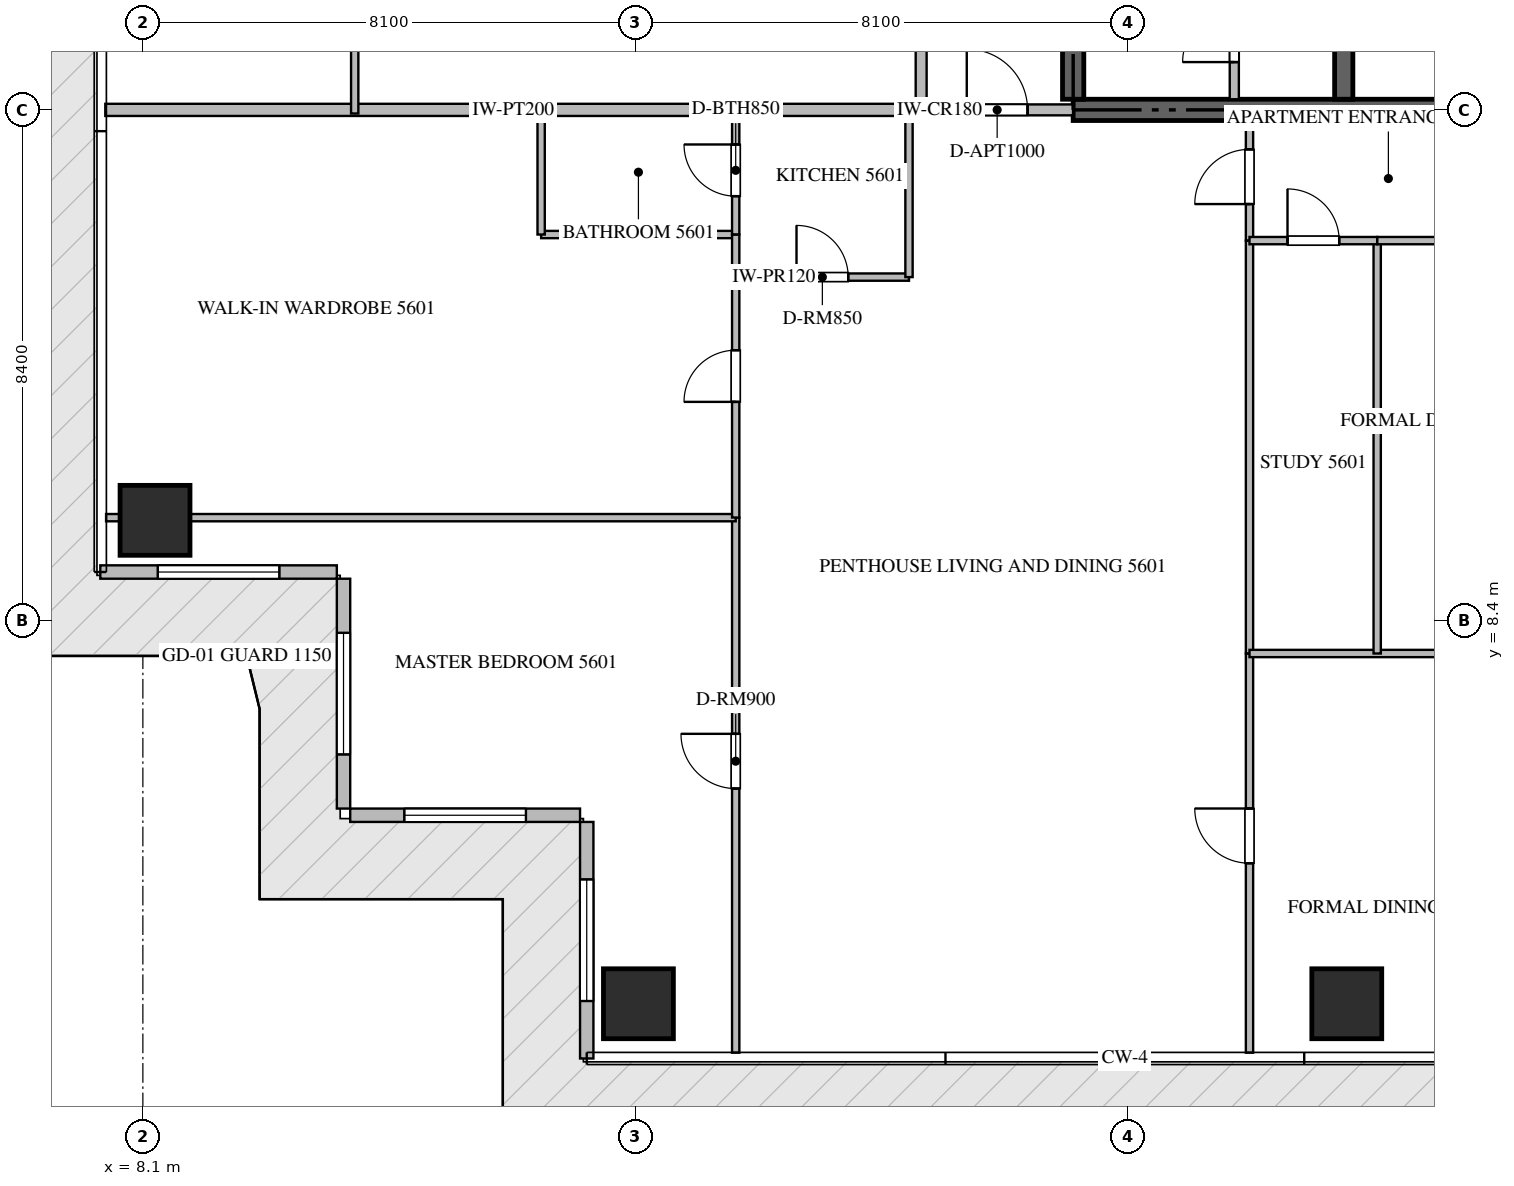
"""IFC4 building model, lengths in metres.
Left out: names, types, materials, properties, quantities, classifications, styles, units other than length and angle.
Written with IfcOpenShell. Run it as: python <this file> out.ifc"""

import sys

from ifc_helpers import new_model, si_unit, direction, frame, frame_2d, origin, origin_2d, place, context, subcontext, project, spatial, rectangle, extrude, source, transform, mapped, element, fill, save


model = new_model("IFC4")
c1 = context("Model", 3, precision=1e-05, world=origin(), true_north=direction((0.0, 1.0)))
c2 = subcontext(c1, "Body", "Model", "MODEL_VIEW")
j1 = project(units=[si_unit("LENGTHUNIT", "METRE"), si_unit("PLANEANGLEUNIT", "RADIAN")], contexts=[c1])
p1 = place(None, origin())
s1 = spatial("IfcSite", under=j1, at=p1, CompositionType="ELEMENT")
p2 = place(p1, origin())
s2 = spatial("IfcBuilding", under=s1, at=p2, CompositionType="ELEMENT")
p3 = place(p2, frame((0.0, 0.0, 225.85)))
s3 = spatial("IfcBuildingStorey", under=s2, at=p3, CompositionType="ELEMENT", Elevation=225.85)
p4 = place(p3, frame((23.4, 16.8, -0.26), z_axis=(0.0, 0.0, 1.0), x_axis=(1.0, 0.0, 0.0)))
e1 = element("IfcWall", 1, at=p4, inside=s3, PredefinedType="SHEAR", context=c2, shape_type="SweptSolid", body=[
    extrude(rectangle(XDim=18.0, YDim=0.35, at=frame_2d((9.0, 0.0))), origin(), (0.0, 0.0, 1.0), 3.848),
])
p5 = place(p3, frame((23.4, 16.975, -0.26), z_axis=(0.0, 0.0, 1.0), x_axis=(0.0, 1.0, 0.0)))
e2 = element("IfcWall", 2, at=p5, inside=s3, PredefinedType="SHEAR", context=c2, shape_type="SweptSolid", body=[
    extrude(rectangle(XDim=4.875, YDim=0.35, at=frame_2d((2.438, 0.0))), origin(), (0.0, 0.0, 1.0), 3.848),
])
p6 = place(p3, frame((27.85, 16.975, -0.26), z_axis=(0.0, 0.0, 1.0), x_axis=(0.0, 1.0, 0.0)))
e3 = element("IfcWall", 3, at=p6, inside=s3, PredefinedType="SHEAR", context=c2, shape_type="SweptSolid", body=[
    extrude(rectangle(XDim=4.875, YDim=0.3, at=frame_2d((2.438, 0.0))), origin(), (0.0, 0.0, 1.0), 3.848),
])
m1 = source(origin(), c2, "Body", "SweptSolid", [
    extrude(rectangle(XDim=1.15, YDim=1.15, at=origin_2d()), origin(), (0.0, 0.0, 1.0), 3.85),
])
for number, where, z_axis, x_axis in (
    (4, (16.25, 2.1, -0.26), (0.0, 0.0, 1.0), (1.0, 0.0, 0.0)),
    (5, (27.9, 2.1, -0.26), (0.0, 0.0, 1.0), (1.0, 0.0, 0.0)),
    (6, (8.3, 10.05, -0.26), (0.0, 0.0, 1.0), (1.0, 0.0, 0.0)),
):
    element("IfcColumn", number, at=place(p3, frame(where, z_axis=z_axis, x_axis=x_axis)), inside=s3, PredefinedType="COLUMN", context=c2, shape_type="MappedRepresentation", body=[
        mapped(m1, transform((0.0, 0.0, 0.0), scale=1.0)),
    ])
p7 = place(p3, frame((7.4, 9.2, 0.0), z_axis=(0.0, 0.0, 1.0), x_axis=(1.0, 0.0, 0.0)))
e7 = element("IfcWall", 7, at=p7, inside=s3, PredefinedType="ELEMENTEDWALL", context=c2, shape_type="SweptSolid", body=[
    extrude(rectangle(XDim=3.89, YDim=0.22, at=frame_2d((1.945, 0.0))), origin(), (0.0, 0.0, 1.0), 3.575),
])
p8 = place(p7, frame((0.945, 0.0, 0.65)))
e8 = element("IfcOpeningElement", 8, at=p8, cuts=e7, PredefinedType="OPENING", context=c2, shape_type="SweptSolid", body=[
    extrude(rectangle(XDim=2.0, YDim=2.2, at=frame_2d((1.0, 1.1))), frame((0.0, 0.12, 0.0), z_axis=(0.0, -1.0, 0.0), x_axis=(1.0, 0.0, 0.0)), (0.0, 0.0, 1.0), 0.24),
])
p9 = place(p3, frame((11.4, 9.09, 0.0), z_axis=(0.0, 0.0, 1.0), x_axis=(0.0, -1.0, 0.0)))
e9 = element("IfcWall", 9, at=p9, inside=s3, PredefinedType="ELEMENTEDWALL", context=c2, shape_type="SweptSolid", body=[
    extrude(rectangle(XDim=3.78, YDim=0.22, at=frame_2d((1.89, 0.0))), origin(), (0.0, 0.0, 1.0), 3.575),
])
p10 = place(p9, frame((0.89, 0.0, 0.65)))
e10 = element("IfcOpeningElement", 10, at=p10, cuts=e9, PredefinedType="OPENING", context=c2, shape_type="SweptSolid", body=[
    extrude(rectangle(XDim=2.0, YDim=2.2, at=frame_2d((1.0, 1.1))), frame((0.0, 0.12, 0.0), z_axis=(0.0, -1.0, 0.0), x_axis=(1.0, 0.0, 0.0)), (0.0, 0.0, 1.0), 0.24),
])
p11 = place(p3, frame((11.51, 5.2, 0.0), z_axis=(0.0, 0.0, 1.0), x_axis=(1.0, 0.0, 0.0)))
e11 = element("IfcWall", 11, at=p11, inside=s3, PredefinedType="ELEMENTEDWALL", context=c2, shape_type="SweptSolid", body=[
    extrude(rectangle(XDim=3.78, YDim=0.22, at=frame_2d((1.89, 0.0))), origin(), (0.0, 0.0, 1.0), 3.575),
])
p12 = place(p11, frame((0.89, 0.0, 0.65)))
e12 = element("IfcOpeningElement", 12, at=p12, cuts=e11, PredefinedType="OPENING", context=c2, shape_type="SweptSolid", body=[
    extrude(rectangle(XDim=2.0, YDim=2.2, at=frame_2d((1.0, 1.1))), frame((0.0, 0.12, 0.0), z_axis=(0.0, -1.0, 0.0), x_axis=(1.0, 0.0, 0.0)), (0.0, 0.0, 1.0), 0.24),
])
p13 = place(p3, frame((15.4, 5.09, 0.0), z_axis=(0.0, 0.0, 1.0), x_axis=(0.0, -1.0, 0.0)))
e13 = element("IfcWall", 13, at=p13, inside=s3, PredefinedType="ELEMENTEDWALL", context=c2, shape_type="SweptSolid", body=[
    extrude(rectangle(XDim=3.89, YDim=0.22, at=frame_2d((1.945, 0.0))), origin(), (0.0, 0.0, 1.0), 3.575),
])
p14 = place(p13, frame((0.945, 0.0, 0.65)))
e14 = element("IfcOpeningElement", 14, at=p14, cuts=e13, PredefinedType="OPENING", context=c2, shape_type="SweptSolid", body=[
    extrude(rectangle(XDim=2.0, YDim=2.2, at=frame_2d((1.0, 1.1))), frame((0.0, 0.12, 0.0), z_axis=(0.0, -1.0, 0.0), x_axis=(1.0, 0.0, 0.0)), (0.0, 0.0, 1.0), 0.24),
])
p15 = place(p3, frame((26.05, 16.975, 0.0), z_axis=(0.0, 0.0, 1.0), x_axis=(0.0, 1.0, 0.0)))
e15 = element("IfcWall", 15, at=p15, inside=s3, PredefinedType="PARTITIONING", context=c2, shape_type="SweptSolid", body=[
    extrude(rectangle(XDim=2.073, YDim=0.15, at=frame_2d((1.037, 0.0))), origin(), (0.0, 0.0, 1.0), 3.59),
])
p16 = place(p15, frame((0.611, 0.0, 0.0)))
e16 = element("IfcOpeningElement", 16, at=p16, cuts=e15, PredefinedType="OPENING", context=c2, shape_type="SweptSolid", body=[
    extrude(rectangle(XDim=0.85, YDim=2.1, at=frame_2d((0.425, 1.05))), frame((0.0, 0.085, 0.0), z_axis=(0.0, -1.0, 0.0), x_axis=(1.0, 0.0, 0.0)), (0.0, 0.0, 1.0), 0.17),
])
p17 = place(p3, frame((7.482, 16.8, 0.0), z_axis=(0.0, 0.0, 1.0), x_axis=(1.0, 0.0, 0.0)))
e17 = element("IfcWall", 17, at=p17, inside=s3, PredefinedType="PARTITIONING", context=c2, shape_type="SweptSolid", body=[
    extrude(rectangle(XDim=13.418, YDim=0.2, at=frame_2d((6.709, 0.0))), origin(), (0.0, 0.0, 1.0), 3.59),
])
p18 = place(p3, frame((20.902, 16.8, 0.0), z_axis=(0.0, 0.0, 1.0), x_axis=(1.0, 0.0, 0.0)))
e18 = element("IfcWall", 18, at=p18, inside=s3, PredefinedType="PARTITIONING", context=c2, shape_type="SweptSolid", body=[
    extrude(rectangle(XDim=2.496, YDim=0.18, at=frame_2d((1.248, 0.0))), origin(), (0.0, 0.0, 1.0), 3.59),
])
p19 = place(p18, frame((0.748, 0.0, 0.0)))
e19 = element("IfcOpeningElement", 19, at=p19, cuts=e18, PredefinedType="OPENING", context=c2, shape_type="SweptSolid", body=[
    extrude(rectangle(XDim=1.0, YDim=2.15, at=frame_2d((0.5, 1.075))), frame((0.0, 0.1, 0.0), z_axis=(0.0, -1.0, 0.0), x_axis=(1.0, 0.0, 0.0)), (0.0, 0.0, 1.0), 0.2),
])
p20 = place(p3, frame((20.9, 16.8, 0.0), z_axis=(0.0, 0.0, 1.0), x_axis=(0.0, 1.0, 0.0)))
e20 = element("IfcWall", 20, at=p20, inside=s3, PredefinedType="PARTITIONING", context=c2, shape_type="SweptSolid", body=[
    extrude(rectangle(XDim=16.8, YDim=0.18, at=frame_2d((8.4, 0.0))), origin(), (0.0, 0.0, 1.0), 3.59),
])
p21 = place(p20, frame((14.5, 0.0, 0.0)))
e21 = element("IfcOpeningElement", 21, at=p21, cuts=e20, PredefinedType="OPENING", context=c2, shape_type="SweptSolid", body=[
    extrude(rectangle(XDim=1.0, YDim=2.15, at=frame_2d((0.5, 1.075))), frame((0.0, 0.1, 0.0), z_axis=(0.0, -1.0, 0.0), x_axis=(1.0, 0.0, 0.0)), (0.0, 0.0, 1.0), 0.2),
])
p22 = place(p3, frame((17.85, 14.05, 0.0), z_axis=(0.0, 0.0, 1.0), x_axis=(1.0, 0.0, 0.0)))
e22 = element("IfcWall", 22, at=p22, inside=s3, PredefinedType="PARTITIONING", context=c2, shape_type="SweptSolid", body=[
    extrude(rectangle(XDim=2.85, YDim=0.12, at=frame_2d((1.425, 0.0))), origin(), (0.0, 0.0, 1.0), 3.59),
])
p23 = place(p22, frame((1.0, 0.0, 0.0)))
e23 = element("IfcOpeningElement", 23, at=p23, cuts=e22, PredefinedType="OPENING", context=c2, shape_type="SweptSolid", body=[
    extrude(rectangle(XDim=0.85, YDim=2.1, at=frame_2d((0.425, 1.05))), frame((0.0, 0.07, 0.0), z_axis=(0.0, -1.0, 0.0), x_axis=(1.0, 0.0, 0.0)), (0.0, 0.0, 1.0), 0.14),
])
p24 = place(p3, frame((20.7, 14.05, 0.0), z_axis=(0.0, 0.0, 1.0), x_axis=(0.0, 1.0, 0.0)))
e24 = element("IfcWall", 24, at=p24, inside=s3, PredefinedType="PARTITIONING", context=c2, shape_type="SweptSolid", body=[
    extrude(rectangle(XDim=2.81, YDim=0.12, at=frame_2d((1.405, 0.0))), origin(), (0.0, 0.0, 1.0), 3.59),
])
p25 = place(p3, frame((17.85, 1.295, 0.0), z_axis=(0.0, 0.0, 1.0), x_axis=(0.0, 1.0, 0.0)))
e25 = element("IfcWall", 25, at=p25, inside=s3, PredefinedType="PARTITIONING", context=c2, shape_type="SweptSolid", body=[
    extrude(rectangle(XDim=8.799, YDim=0.12, at=frame_2d((4.399, 0.0))), origin(), (0.0, 0.0, 1.0), 3.59),
])
p26 = place(p25, frame((4.344, 0.0, 0.0)))
e26 = element("IfcOpeningElement", 26, at=p26, cuts=e25, PredefinedType="OPENING", context=c2, shape_type="SweptSolid", body=[
    extrude(rectangle(XDim=0.9, YDim=2.1, at=frame_2d((0.45, 1.05))), frame((0.0, 0.07, 0.0), z_axis=(0.0, -1.0, 0.0), x_axis=(1.0, 0.0, 0.0)), (0.0, 0.0, 1.0), 0.14),
])
p27 = place(p3, frame((7.495, 10.094, 0.0), z_axis=(0.0, 0.0, 1.0), x_axis=(1.0, 0.0, 0.0)))
e27 = element("IfcWall", 27, at=p27, inside=s3, PredefinedType="PARTITIONING", context=c2, shape_type="SweptSolid", body=[
    extrude(rectangle(XDim=10.355, YDim=0.12, at=frame_2d((5.177, 0.0))), origin(), (0.0, 0.0, 1.0), 3.122),
])
p28 = place(p3, frame((14.65, 14.75, 0.0), z_axis=(0.0, 0.0, 1.0), x_axis=(1.0, 0.0, 0.0)))
e28 = element("IfcWall", 28, at=p28, inside=s3, PredefinedType="PARTITIONING", context=c2, shape_type="SweptSolid", body=[
    extrude(rectangle(XDim=3.2, YDim=0.12, at=frame_2d((1.6, 0.0))), origin(), (0.0, 0.0, 1.0), 3.59),
])
p29 = place(p3, frame((14.65, 14.75, 0.0), z_axis=(0.0, 0.0, 1.0), x_axis=(0.0, 1.0, 0.0)))
e29 = element("IfcWall", 29, at=p29, inside=s3, PredefinedType="PARTITIONING", context=c2, shape_type="SweptSolid", body=[
    extrude(rectangle(XDim=2.11, YDim=0.12, at=frame_2d((1.055, 0.0))), origin(), (0.0, 0.0, 1.0), 3.59),
])
p30 = place(p3, frame((17.85, 10.096, 0.0), z_axis=(0.0, 0.0, 1.0), x_axis=(0.0, 1.0, 0.0)))
e30 = element("IfcWall", 30, at=p30, inside=s3, PredefinedType="PARTITIONING", context=c2, shape_type="SweptSolid", body=[
    extrude(rectangle(XDim=4.654, YDim=0.12, at=frame_2d((2.327, 0.0))), origin(), (0.0, 0.0, 1.0), 3.59),
])
p31 = place(p30, frame((1.902, 0.0, 0.0)))
e31 = element("IfcOpeningElement", 31, at=p31, cuts=e30, PredefinedType="OPENING", context=c2, shape_type="SweptSolid", body=[
    extrude(rectangle(XDim=0.85, YDim=2.1, at=frame_2d((0.425, 1.05))), frame((0.0, 0.07, 0.0), z_axis=(0.0, -1.0, 0.0), x_axis=(1.0, 0.0, 0.0)), (0.0, 0.0, 1.0), 0.14),
])
p32 = place(p3, frame((17.85, 14.752, 0.0), z_axis=(0.0, 0.0, 1.0), x_axis=(0.0, 1.0, 0.0)))
e32 = element("IfcWall", 32, at=p32, inside=s3, PredefinedType="PARTITIONING", context=c2, shape_type="SweptSolid", body=[
    extrude(rectangle(XDim=2.108, YDim=0.12, at=frame_2d((1.054, 0.0))), origin(), (0.0, 0.0, 1.0), 3.59),
])
p33 = place(p32, frame((0.629, 0.0, 0.0)))
e33 = element("IfcOpeningElement", 33, at=p33, cuts=e32, PredefinedType="OPENING", context=c2, shape_type="SweptSolid", body=[
    extrude(rectangle(XDim=0.85, YDim=2.1, at=frame_2d((0.425, 1.05))), frame((0.0, 0.07, 0.0), z_axis=(0.0, -1.0, 0.0), x_axis=(1.0, 0.0, 0.0)), (0.0, 0.0, 1.0), 0.14),
])
p34 = place(p3, frame((26.3, 14.65, 0.0), z_axis=(0.0, 0.0, 1.0), x_axis=(0.0, 1.0, 0.0)))
e34 = element("IfcWall", 34, at=p34, inside=s3, PredefinedType="PARTITIONING", context=c2, shape_type="SweptSolid", body=[
    extrude(rectangle(XDim=1.975, YDim=0.12, at=frame_2d((0.988, 0.0))), origin(), (0.0, 0.0, 1.0), 3.59),
])
p35 = place(p34, frame((0.601, 0.0, 0.0)))
e35 = element("IfcOpeningElement", 35, at=p35, cuts=e34, PredefinedType="OPENING", context=c2, shape_type="SweptSolid", body=[
    extrude(rectangle(XDim=0.9, YDim=2.1, at=frame_2d((0.45, 1.05))), frame((0.0, 0.07, 0.0), z_axis=(0.0, -1.0, 0.0), x_axis=(1.0, 0.0, 0.0)), (0.0, 0.0, 1.0), 0.14),
])
p36 = place(p3, frame((26.3, 1.295, 0.0), z_axis=(0.0, 0.0, 1.0), x_axis=(0.0, 1.0, 0.0)))
e36 = element("IfcWall", 36, at=p36, inside=s3, PredefinedType="PARTITIONING", context=c2, shape_type="SweptSolid", body=[
    extrude(rectangle(XDim=6.565, YDim=0.12, at=frame_2d((3.283, 0.0))), origin(), (0.0, 0.0, 1.0), 3.59),
])
p37 = place(p36, frame((3.116, 0.0, 0.0)))
e37 = element("IfcOpeningElement", 37, at=p37, cuts=e36, PredefinedType="OPENING", context=c2, shape_type="SweptSolid", body=[
    extrude(rectangle(XDim=0.9, YDim=2.1, at=frame_2d((0.45, 1.05))), frame((0.0, 0.07, 0.0), z_axis=(0.0, -1.0, 0.0), x_axis=(1.0, 0.0, 0.0)), (0.0, 0.0, 1.0), 0.14),
])
p38 = place(p3, frame((26.3, 7.862, 0.0), z_axis=(0.0, 0.0, 1.0), x_axis=(0.0, 1.0, 0.0)))
e38 = element("IfcWall", 38, at=p38, inside=s3, PredefinedType="PARTITIONING", context=c2, shape_type="SweptSolid", body=[
    extrude(rectangle(XDim=6.786, YDim=0.12, at=frame_2d((3.393, 0.0))), origin(), (0.0, 0.0, 1.0), 3.59),
])
p39 = place(p3, frame((26.3, 7.86, 0.0), z_axis=(0.0, 0.0, 1.0), x_axis=(1.0, 0.0, 0.0)))
e39 = element("IfcWall", 39, at=p39, inside=s3, PredefinedType="PARTITIONING", context=c2, shape_type="SweptSolid", body=[
    extrude(rectangle(XDim=5.15, YDim=0.12, at=frame_2d((2.575, 0.0))), origin(), (0.0, 0.0, 1.0), 3.59),
])
p40 = place(p3, frame((28.4, 7.86, 0.0), z_axis=(0.0, 0.0, 1.0), x_axis=(0.0, 1.0, 0.0)))
e40 = element("IfcWall", 40, at=p40, inside=s3, PredefinedType="PARTITIONING", context=c2, shape_type="SweptSolid", body=[
    extrude(rectangle(XDim=6.79, YDim=0.12, at=frame_2d((3.395, 0.0))), origin(), (0.0, 0.0, 1.0), 3.59),
])
p41 = place(p3, frame((26.3, 14.65, 0.0), z_axis=(0.0, 0.0, 1.0), x_axis=(1.0, 0.0, 0.0)))
e41 = element("IfcWall", 41, at=p41, inside=s3, PredefinedType="PARTITIONING", context=c2, shape_type="SweptSolid", body=[
    extrude(rectangle(XDim=2.1, YDim=0.12, at=frame_2d((1.05, 0.0))), origin(), (0.0, 0.0, 1.0), 3.59),
])
p42 = place(p41, frame((0.625, 0.0, 0.0)))
e42 = element("IfcOpeningElement", 42, at=p42, cuts=e41, PredefinedType="OPENING", context=c2, shape_type="SweptSolid", body=[
    extrude(rectangle(XDim=0.85, YDim=2.1, at=frame_2d((0.425, 1.05))), frame((0.0, 0.07, 0.0), z_axis=(0.0, -1.0, 0.0), x_axis=(1.0, 0.0, 0.0)), (0.0, 0.0, 1.0), 0.14),
])
p43 = place(p3, frame((28.402, 14.65, 0.0), z_axis=(0.0, 0.0, 1.0), x_axis=(1.0, 0.0, 0.0)))
e43 = element("IfcWall", 43, at=p43, inside=s3, PredefinedType="PARTITIONING", context=c2, shape_type="SweptSolid", body=[
    extrude(rectangle(XDim=3.048, YDim=0.12, at=frame_2d((1.524, 0.0))), origin(), (0.0, 0.0, 1.0), 3.59),
])
p44 = place(p43, frame((1.099, 0.0, 0.0)))
e44 = element("IfcOpeningElement", 44, at=p44, cuts=e43, PredefinedType="OPENING", context=c2, shape_type="SweptSolid", body=[
    extrude(rectangle(XDim=0.85, YDim=2.1, at=frame_2d((0.425, 1.05))), frame((0.0, 0.07, 0.0), z_axis=(0.0, -1.0, 0.0), x_axis=(1.0, 0.0, 0.0)), (0.0, 0.0, 1.0), 0.14),
])
p45 = place(p3, frame((11.584, 16.74, 0.0), z_axis=(0.0, 0.0, 1.0), x_axis=(0.0, 1.0, 0.0)))
e45 = element("IfcWall", 45, at=p45, inside=s3, PredefinedType="PARTITIONING", context=c2, shape_type="SweptSolid", body=[
    extrude(rectangle(XDim=10.48, YDim=0.12, at=frame_2d((5.24, 0.0))), origin(), (0.0, 0.0, 1.0), 3.59),
])
m2 = source(origin(), c2, "Body", "SweptSolid", [
    extrude(rectangle(XDim=2.0, YDim=2.2, at=frame_2d((1.0, 1.1))), frame((0.0, 0.03, 0.0), z_axis=(0.0, -1.0, 0.0), x_axis=(1.0, 0.0, 0.0)), (0.0, 0.0, 1.0), 0.06),
])
p46 = place(p8, origin())
e46 = element("IfcWindow", 46, at=p46, inside=s3, PartitioningType="SINGLE_PANEL", PredefinedType="WINDOW", context=c2, shape_type="MappedRepresentation", body=[
    mapped(m2, transform((0.0, 0.0, 0.0), scale=1.0)),
])
fill(e8, e46)
p47 = place(p10, origin())
e47 = element("IfcWindow", 47, at=p47, inside=s3, PartitioningType="SINGLE_PANEL", PredefinedType="WINDOW", context=c2, shape_type="MappedRepresentation", body=[
    mapped(m2, transform((0.0, 0.0, 0.0), scale=1.0)),
])
fill(e10, e47)
p48 = place(p12, origin())
e48 = element("IfcWindow", 48, at=p48, inside=s3, PartitioningType="SINGLE_PANEL", PredefinedType="WINDOW", context=c2, shape_type="MappedRepresentation", body=[
    mapped(m2, transform((0.0, 0.0, 0.0), scale=1.0)),
])
fill(e12, e48)
p49 = place(p14, origin())
e49 = element("IfcWindow", 49, at=p49, inside=s3, PartitioningType="SINGLE_PANEL", PredefinedType="WINDOW", context=c2, shape_type="MappedRepresentation", body=[
    mapped(m2, transform((0.0, 0.0, 0.0), scale=1.0)),
])
fill(e14, e49)
m3 = source(origin(), c2, "Body", "SweptSolid", [
    extrude(rectangle(XDim=0.85, YDim=2.1, at=frame_2d((0.425, 1.05))), frame((0.0, 0.025, 0.0), z_axis=(0.0, -1.0, 0.0), x_axis=(1.0, 0.0, 0.0)), (0.0, 0.0, 1.0), 0.05),
])
p50 = place(p16, origin())
e50 = element("IfcDoor", 50, at=p50, inside=s3, OperationType="SINGLE_SWING_LEFT", PredefinedType="DOOR", context=c2, shape_type="MappedRepresentation", body=[
    mapped(m3, transform((0.0, 0.0, 0.0), scale=1.0)),
])
fill(e16, e50)
m4 = source(origin(), c2, "Body", "SweptSolid", [
    extrude(rectangle(XDim=1.0, YDim=2.15, at=frame_2d((0.5, 1.075))), frame((0.0, 0.025, 0.0), z_axis=(0.0, -1.0, 0.0), x_axis=(1.0, 0.0, 0.0)), (0.0, 0.0, 1.0), 0.05),
])
p51 = place(p19, origin())
e51 = element("IfcDoor", 51, at=p51, inside=s3, OperationType="SINGLE_SWING_LEFT", PredefinedType="DOOR", context=c2, shape_type="MappedRepresentation", body=[
    mapped(m4, transform((0.0, 0.0, 0.0), scale=1.0)),
])
fill(e19, e51)
p52 = place(p23, origin())
e52 = element("IfcDoor", 52, at=p52, inside=s3, OperationType="SINGLE_SWING_LEFT", PredefinedType="DOOR", context=c2, shape_type="MappedRepresentation", body=[
    mapped(m3, transform((0.0, 0.0, 0.0), scale=1.0)),
])
fill(e23, e52)
m5 = source(origin(), c2, "Body", "SweptSolid", [
    extrude(rectangle(XDim=0.9, YDim=2.1, at=frame_2d((0.45, 1.05))), frame((0.0, 0.025, 0.0), z_axis=(0.0, -1.0, 0.0), x_axis=(1.0, 0.0, 0.0)), (0.0, 0.0, 1.0), 0.05),
])
p53 = place(p26, origin())
e53 = element("IfcDoor", 53, at=p53, inside=s3, OperationType="SINGLE_SWING_RIGHT", PredefinedType="DOOR", context=c2, shape_type="MappedRepresentation", body=[
    mapped(m5, transform((0.0, 0.0, 0.0), scale=1.0)),
])
fill(e26, e53)
p54 = place(p31, origin())
e54 = element("IfcDoor", 54, at=p54, inside=s3, OperationType="SINGLE_SWING_LEFT", PredefinedType="DOOR", context=c2, shape_type="MappedRepresentation", body=[
    mapped(m3, transform((0.0, 0.0, 0.0), scale=1.0)),
])
fill(e31, e54)
p55 = place(p33, origin())
e55 = element("IfcDoor", 55, at=p55, inside=s3, OperationType="SINGLE_SWING_RIGHT", PredefinedType="DOOR", context=c2, shape_type="MappedRepresentation", body=[
    mapped(m3, transform((0.0, 0.0, 0.0), scale=1.0)),
])
fill(e33, e55)
p56 = place(p35, origin())
e56 = element("IfcDoor", 56, at=p56, inside=s3, OperationType="SINGLE_SWING_LEFT", PredefinedType="DOOR", context=c2, shape_type="MappedRepresentation", body=[
    mapped(m5, transform((0.0, 0.0, 0.0), scale=1.0)),
])
fill(e35, e56)
p57 = place(p37, origin())
e57 = element("IfcDoor", 57, at=p57, inside=s3, OperationType="SINGLE_SWING_RIGHT", PredefinedType="DOOR", context=c2, shape_type="MappedRepresentation", body=[
    mapped(m5, transform((0.0, 0.0, 0.0), scale=1.0)),
])
fill(e37, e57)
p58 = place(p42, origin())
e58 = element("IfcDoor", 58, at=p58, inside=s3, OperationType="SINGLE_SWING_LEFT", PredefinedType="DOOR", context=c2, shape_type="MappedRepresentation", body=[
    mapped(m3, transform((0.0, 0.0, 0.0), scale=1.0)),
])
fill(e42, e58)
save(model, sys.argv[1])
